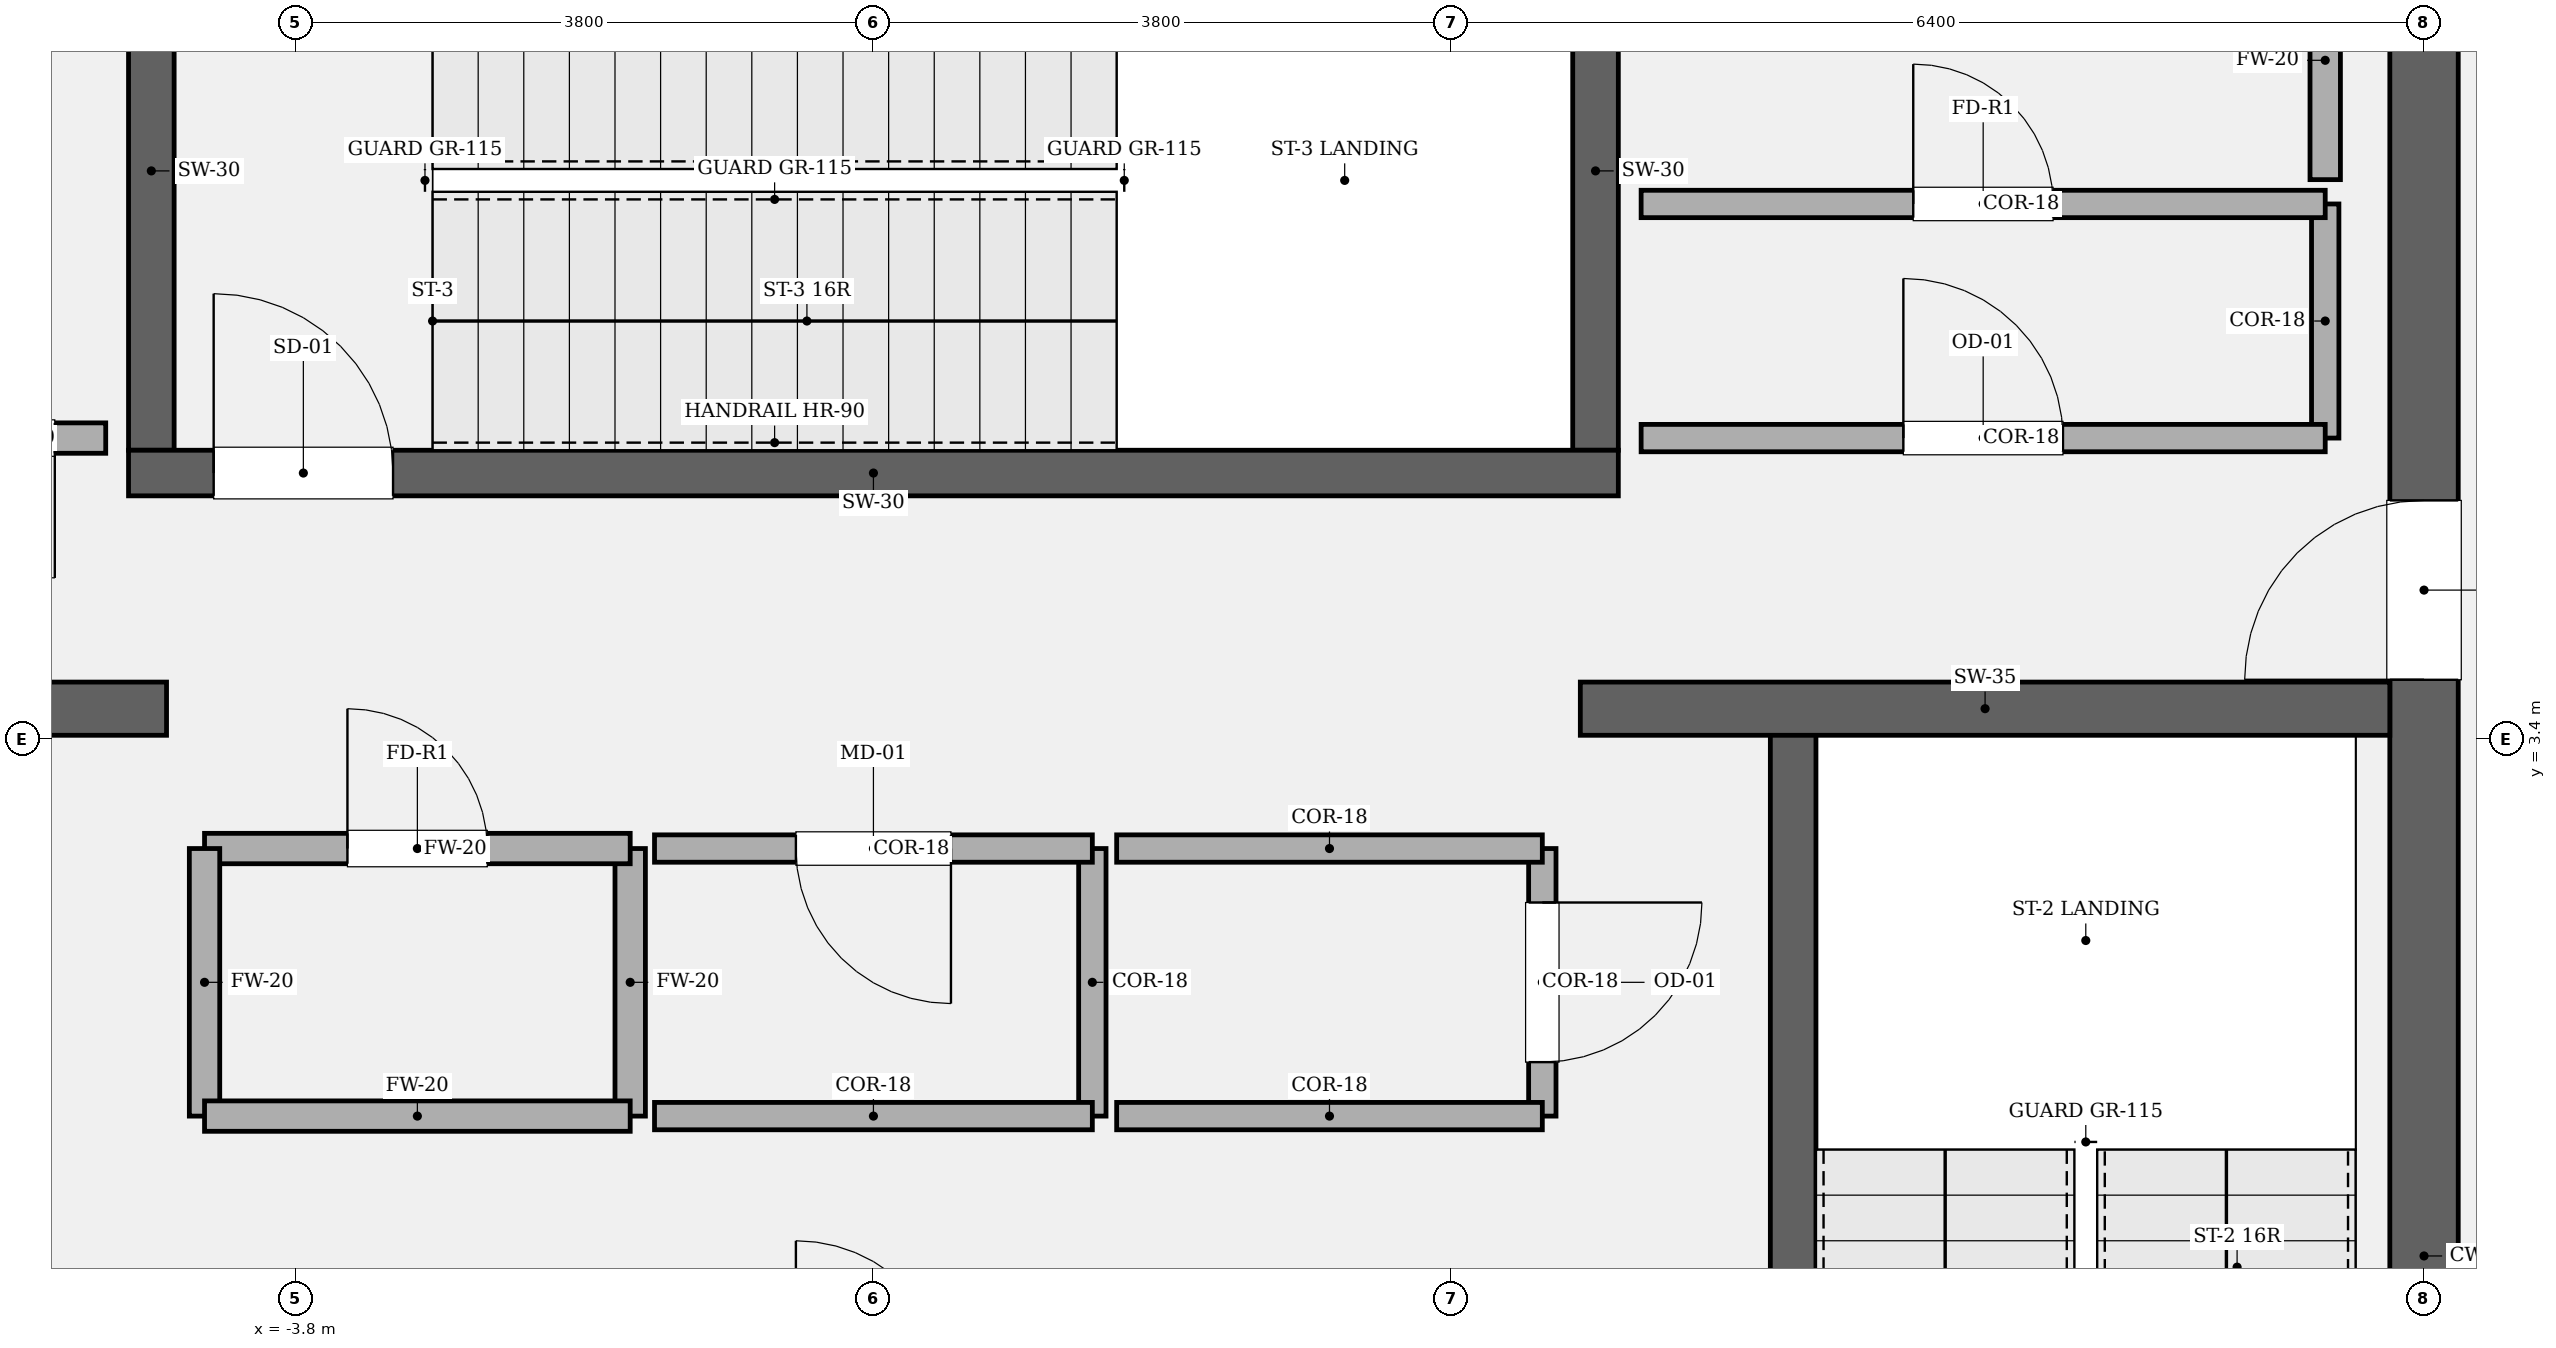
"""IFC4 building model, lengths in metres.
Left out: names, types, materials, properties, quantities, classifications, styles, units other than length and angle.
Written with IfcOpenShell. Run it as: python <this file> out.ifc"""

import sys

from ifc_helpers import new_model, si_unit, direction, frame, frame_2d, origin, place, context, subcontext, project, spatial, rectangle, extrude, element, fill, save


model = new_model("IFC4")
c1 = context("Model", 3, precision=1e-05, world=origin(), true_north=direction((0.0, 1.0)))
c2 = subcontext(c1, "Body", "Model", "MODEL_VIEW")
j1 = project(units=[si_unit("LENGTHUNIT", "METRE"), si_unit("PLANEANGLEUNIT", "RADIAN")], contexts=[c1])
p1 = place(None, origin())
s1 = spatial("IfcSite", under=j1, at=p1, CompositionType="ELEMENT")
p2 = place(p1, origin())
s2 = spatial("IfcBuilding", under=s1, at=p2, CompositionType="ELEMENT")
p3 = place(p2, frame((0.0, 0.0, 339.0)))
s3 = spatial("IfcBuildingStorey", under=s2, at=p3, CompositionType="ELEMENT", Elevation=339.0)
p4 = place(p3, frame((10.2, 8.975, 0.0), z_axis=(0.0, 0.0, 1.0), x_axis=(0.0, -1.0, 0.0)))
e1 = element("IfcWall", 1, at=p4, inside=s3, PredefinedType="SHEAR", context=c2, shape_type="SweptSolid", body=[
    extrude(rectangle(XDim=17.95, YDim=0.45, at=frame_2d((8.975, 0.0))), origin(), (0.0, 0.0, 1.0), 4.8),
])
p5 = place(p4, frame((4.005, 0.0, 0.0)))
e2 = element("IfcOpeningElement", 2, at=p5, cuts=e1, PredefinedType="OPENING", context=c2, shape_type="SweptSolid", body=[
    extrude(rectangle(XDim=1.18, YDim=2.2, at=frame_2d((0.59, 1.1))), frame((0.0, 0.235, 0.0), z_axis=(0.0, -1.0, 0.0), x_axis=(1.0, 0.0, 0.0)), (0.0, 0.0, 1.0), 0.47),
])
p6 = place(p3, frame((6.05, 3.45, 0.0), z_axis=(0.0, 0.0, 1.0), x_axis=(0.0, -1.0, 0.0)))
e3 = element("IfcWall", 3, at=p6, inside=s3, PredefinedType="SOLIDWALL", context=c2, shape_type="SweptSolid", body=[
    extrude(rectangle(XDim=8.95, YDim=0.3, at=frame_2d((4.475, 0.0))), origin(), (0.0, 0.0, 1.0), 4.8),
])
for number, where, z_axis, x_axis in (
    (4, (-4.75, 5.3, 0.0), (0.0, 0.0, 1.0), (0.0, 1.0, 0.0)),
    (5, (4.75, 8.975, 0.0), (0.0, 0.0, 1.0), (0.0, -1.0, 0.0)),
):
    element("IfcWall", number, at=place(p3, frame(where, z_axis=z_axis, x_axis=x_axis)), inside=s3, PredefinedType="SOLIDWALL", context=c2, shape_type="SweptSolid", body=[
        extrude(rectangle(XDim=3.675, YDim=0.3, at=frame_2d((1.837, 0.0))), origin(), (0.0, 0.0, 1.0), 4.8),
    ])
p7 = place(p3, frame((-4.9, 5.15, 0.0), z_axis=(0.0, 0.0, 1.0), x_axis=(1.0, 0.0, 0.0)))
e6 = element("IfcWall", 6, at=p7, inside=s3, PredefinedType="SOLIDWALL", context=c2, shape_type="SweptSolid", body=[
    extrude(rectangle(XDim=9.8, YDim=0.3, at=frame_2d((4.9, 0.0))), origin(), (0.0, 0.0, 1.0), 4.8),
])
p8 = place(p7, frame((0.56, 0.0, 0.0)))
e7 = element("IfcOpeningElement", 7, at=p8, cuts=e6, PredefinedType="OPENING", context=c2, shape_type="SweptSolid", body=[
    extrude(rectangle(XDim=1.18, YDim=2.2, at=frame_2d((0.59, 1.1))), frame((0.0, 0.16, 0.0), z_axis=(0.0, -1.0, 0.0), x_axis=(1.0, 0.0, 0.0)), (0.0, 0.0, 1.0), 0.32),
])
for number, where, z_axis, x_axis in (
    (8, (-9.975, 3.6, 0.0), (0.0, 0.0, 1.0), (1.0, 0.0, 0.0)),
    (9, (4.65, 3.6, 0.0), (0.0, 0.0, 1.0), (1.0, 0.0, 0.0)),
):
    element("IfcWall", number, at=place(p3, frame(where, z_axis=z_axis, x_axis=x_axis)), inside=s3, PredefinedType="SOLIDWALL", context=c2, shape_type="SweptSolid", body=[
        extrude(rectangle(XDim=5.325, YDim=0.35, at=frame_2d((2.663, 0.0))), origin(), (0.0, 0.0, 1.0), 4.8),
    ])
p9 = place(p3, frame((-1.6, 0.92, 0.0), z_axis=(0.0, 0.0, 1.0), x_axis=(0.0, 1.0, 0.0)))
e10 = element("IfcWall", 10, at=p9, inside=s3, PredefinedType="SOLIDWALL", context=c2, shape_type="SweptSolid", body=[
    extrude(rectangle(XDim=1.76, YDim=0.2, at=frame_2d((0.88, 0.0))), origin(), (0.0, 0.0, 1.0), 4.52),
])
p10 = place(p3, frame((-1.6, 2.68, 0.0), z_axis=(0.0, 0.0, 1.0), x_axis=(-1.0, 0.0, 0.0)))
e11 = element("IfcWall", 11, at=p10, inside=s3, PredefinedType="SOLIDWALL", context=c2, shape_type="SweptSolid", body=[
    extrude(rectangle(XDim=2.8, YDim=0.2, at=frame_2d((1.4, 0.0))), origin(), (0.0, 0.0, 1.0), 4.52),
])
p11 = place(p10, frame((0.94, 0.0, 0.0)))
e12 = element("IfcOpeningElement", 12, at=p11, cuts=e11, PredefinedType="OPENING", context=c2, shape_type="SweptSolid", body=[
    extrude(rectangle(XDim=0.92, YDim=2.1, at=frame_2d((0.46, 1.05))), frame((0.0, 0.11, 0.0), z_axis=(0.0, -1.0, 0.0), x_axis=(1.0, 0.0, 0.0)), (0.0, 0.0, 1.0), 0.22),
])
p12 = place(p3, frame((-4.4, 2.68, 0.0), z_axis=(0.0, 0.0, 1.0), x_axis=(0.0, -1.0, 0.0)))
e13 = element("IfcWall", 13, at=p12, inside=s3, PredefinedType="SOLIDWALL", context=c2, shape_type="SweptSolid", body=[
    extrude(rectangle(XDim=1.76, YDim=0.2, at=frame_2d((0.88, 0.0))), origin(), (0.0, 0.0, 1.0), 4.52),
])
p13 = place(p3, frame((-4.4, 0.92, 0.0), z_axis=(0.0, 0.0, 1.0), x_axis=(1.0, 0.0, 0.0)))
e14 = element("IfcWall", 14, at=p13, inside=s3, PredefinedType="SOLIDWALL", context=c2, shape_type="SweptSolid", body=[
    extrude(rectangle(XDim=2.8, YDim=0.2, at=frame_2d((1.4, 0.0))), origin(), (0.0, 0.0, 1.0), 4.52),
])
p14 = place(p3, frame((1.44, 0.92, 0.0), z_axis=(0.0, 0.0, 1.0), x_axis=(0.0, 1.0, 0.0)))
e15 = element("IfcWall", 15, at=p14, inside=s3, PredefinedType="PARTITIONING", context=c2, shape_type="SweptSolid", body=[
    extrude(rectangle(XDim=1.76, YDim=0.18, at=frame_2d((0.88, 0.0))), origin(), (0.0, 0.0, 1.0), 4.52),
])
p15 = place(p3, frame((1.44, 2.68, 0.0), z_axis=(0.0, 0.0, 1.0), x_axis=(-1.0, 0.0, 0.0)))
e16 = element("IfcWall", 16, at=p15, inside=s3, PredefinedType="PARTITIONING", context=c2, shape_type="SweptSolid", body=[
    extrude(rectangle(XDim=2.88, YDim=0.18, at=frame_2d((1.44, 0.0))), origin(), (0.0, 0.0, 1.0), 4.52),
])
p16 = place(p15, frame((0.93, 0.0, 0.0)))
e17 = element("IfcOpeningElement", 17, at=p16, cuts=e16, PredefinedType="OPENING", context=c2, shape_type="SweptSolid", body=[
    extrude(rectangle(XDim=1.02, YDim=2.2, at=frame_2d((0.51, 1.1))), frame((0.0, 0.1, 0.0), z_axis=(0.0, -1.0, 0.0), x_axis=(1.0, 0.0, 0.0)), (0.0, 0.0, 1.0), 0.2),
])
p17 = place(p3, frame((-1.44, 0.92, 0.0), z_axis=(0.0, 0.0, 1.0), x_axis=(1.0, 0.0, 0.0)))
e18 = element("IfcWall", 18, at=p17, inside=s3, PredefinedType="PARTITIONING", context=c2, shape_type="SweptSolid", body=[
    extrude(rectangle(XDim=2.88, YDim=0.18, at=frame_2d((1.44, 0.0))), origin(), (0.0, 0.0, 1.0), 4.52),
])
p18 = place(p3, frame((4.4, 0.92, 0.0), z_axis=(0.0, 0.0, 1.0), x_axis=(0.0, 1.0, 0.0)))
e19 = element("IfcWall", 19, at=p18, inside=s3, PredefinedType="PARTITIONING", context=c2, shape_type="SweptSolid", body=[
    extrude(rectangle(XDim=1.76, YDim=0.18, at=frame_2d((0.88, 0.0))), origin(), (0.0, 0.0, 1.0), 4.52),
])
p19 = place(p18, frame((0.355, 0.0, 0.0)))
e20 = element("IfcOpeningElement", 20, at=p19, cuts=e19, PredefinedType="OPENING", context=c2, shape_type="SweptSolid", body=[
    extrude(rectangle(XDim=1.05, YDim=2.2, at=frame_2d((0.525, 1.1))), frame((0.0, 0.1, 0.0), z_axis=(0.0, -1.0, 0.0), x_axis=(1.0, 0.0, 0.0)), (0.0, 0.0, 1.0), 0.2),
])
for number, where, z_axis, x_axis in (
    (21, (4.4, 2.68, 0.0), (0.0, 0.0, 1.0), (-1.0, 0.0, 0.0)),
    (22, (1.6, 0.92, 0.0), (0.0, 0.0, 1.0), (1.0, 0.0, 0.0)),
):
    element("IfcWall", number, at=place(p3, frame(where, z_axis=z_axis, x_axis=x_axis)), inside=s3, PredefinedType="PARTITIONING", context=c2, shape_type="SweptSolid", body=[
        extrude(rectangle(XDim=2.8, YDim=0.18, at=frame_2d((1.4, 0.0))), origin(), (0.0, 0.0, 1.0), 4.52),
    ])
p20 = place(p3, frame((-6.64, 5.38, 0.0), z_axis=(0.0, 0.0, 1.0), x_axis=(1.0, 0.0, 0.0)))
e23 = element("IfcWall", 23, at=p20, inside=s3, PredefinedType="SOLIDWALL", context=c2, shape_type="SweptSolid", body=[
    extrude(rectangle(XDim=1.59, YDim=0.2, at=frame_2d((0.795, 0.0))), origin(), (0.0, 0.0, 1.0), 4.52),
])
p21 = place(p20, frame((0.335, 0.0, 0.0)))
e24 = element("IfcOpeningElement", 24, at=p21, cuts=e23, PredefinedType="OPENING", context=c2, shape_type="SweptSolid", body=[
    extrude(rectangle(XDim=0.92, YDim=2.1, at=frame_2d((0.46, 1.05))), frame((0.0, 0.11, 0.0), z_axis=(0.0, -1.0, 0.0), x_axis=(1.0, 0.0, 0.0)), (0.0, 0.0, 1.0), 0.22),
])
p22 = place(p3, frame((9.55, 5.38, 0.0), z_axis=(0.0, 0.0, 1.0), x_axis=(0.0, 1.0, 0.0)))
e25 = element("IfcWall", 25, at=p22, inside=s3, PredefinedType="PARTITIONING", context=c2, shape_type="SweptSolid", body=[
    extrude(rectangle(XDim=1.54, YDim=0.18, at=frame_2d((0.77, 0.0))), origin(), (0.0, 0.0, 1.0), 4.52),
])
p23 = place(p3, frame((9.55, 6.92, 0.0), z_axis=(0.0, 0.0, 1.0), x_axis=(-1.0, 0.0, 0.0)))
e26 = element("IfcWall", 26, at=p23, inside=s3, PredefinedType="PARTITIONING", context=c2, shape_type="SweptSolid", body=[
    extrude(rectangle(XDim=4.5, YDim=0.18, at=frame_2d((2.25, 0.0))), origin(), (0.0, 0.0, 1.0), 4.52),
])
p24 = place(p23, frame((1.79, 0.0, 0.0)))
e27 = element("IfcOpeningElement", 27, at=p24, cuts=e26, PredefinedType="OPENING", context=c2, shape_type="SweptSolid", body=[
    extrude(rectangle(XDim=0.92, YDim=2.1, at=frame_2d((0.46, 1.05))), frame((0.0, 0.1, 0.0), z_axis=(0.0, -1.0, 0.0), x_axis=(1.0, 0.0, 0.0)), (0.0, 0.0, 1.0), 0.2),
])
p25 = place(p3, frame((5.05, 5.38, 0.0), z_axis=(0.0, 0.0, 1.0), x_axis=(1.0, 0.0, 0.0)))
e28 = element("IfcWall", 28, at=p25, inside=s3, PredefinedType="PARTITIONING", context=c2, shape_type="SweptSolid", body=[
    extrude(rectangle(XDim=4.5, YDim=0.18, at=frame_2d((2.25, 0.0))), origin(), (0.0, 0.0, 1.0), 4.52),
])
p26 = place(p25, frame((1.725, 0.0, 0.0)))
e29 = element("IfcOpeningElement", 29, at=p26, cuts=e28, PredefinedType="OPENING", context=c2, shape_type="SweptSolid", body=[
    extrude(rectangle(XDim=1.05, YDim=2.2, at=frame_2d((0.525, 1.1))), frame((0.0, 0.1, 0.0), z_axis=(0.0, -1.0, 0.0), x_axis=(1.0, 0.0, 0.0)), (0.0, 0.0, 1.0), 0.2),
])
p27 = place(p3, frame((9.55, 7.08, 0.0), z_axis=(0.0, 0.0, 1.0), x_axis=(0.0, 1.0, 0.0)))
e30 = element("IfcWall", 30, at=p27, inside=s3, PredefinedType="SOLIDWALL", context=c2, shape_type="SweptSolid", body=[
    extrude(rectangle(XDim=1.57, YDim=0.2, at=frame_2d((0.785, 0.0))), origin(), (0.0, 0.0, 1.0), 4.52),
])
p28 = place(p8, origin())
e31 = element("IfcDoor", 31, at=p28, inside=s3, OperationType="SINGLE_SWING_LEFT", PredefinedType="DOOR", context=c2, shape_type="SweptSolid", body=[
    extrude(rectangle(XDim=1.18, YDim=2.2, at=frame_2d((0.59, 1.1))), frame((0.0, 0.025, 0.0), z_axis=(0.0, -1.0, 0.0), x_axis=(1.0, 0.0, 0.0)), (0.0, 0.0, 1.0), 0.05),
])
fill(e7, e31)
p29 = place(p5, origin())
e32 = element("IfcDoor", 32, at=p29, inside=s3, OperationType="SINGLE_SWING_RIGHT", PredefinedType="DOOR", context=c2, shape_type="SweptSolid", body=[
    extrude(rectangle(XDim=1.18, YDim=2.2, at=frame_2d((0.59, 1.1))), frame((0.0, 0.025, 0.0), z_axis=(0.0, -1.0, 0.0), x_axis=(1.0, 0.0, 0.0)), (0.0, 0.0, 1.0), 0.05),
])
fill(e2, e32)
p30 = place(p11, origin())
e33 = element("IfcDoor", 33, at=p30, inside=s3, OperationType="SINGLE_SWING_RIGHT", PredefinedType="DOOR", context=c2, shape_type="SweptSolid", body=[
    extrude(rectangle(XDim=0.92, YDim=2.1, at=frame_2d((0.46, 1.05))), frame((0.0, 0.025, 0.0), z_axis=(0.0, -1.0, 0.0), x_axis=(1.0, 0.0, 0.0)), (0.0, 0.0, 1.0), 0.05),
])
fill(e12, e33)
p31 = place(p16, origin())
e34 = element("IfcDoor", 34, at=p31, inside=s3, OperationType="SINGLE_SWING_LEFT", PredefinedType="DOOR", context=c2, shape_type="SweptSolid", body=[
    extrude(rectangle(XDim=1.02, YDim=2.2, at=frame_2d((0.51, 1.1))), frame((0.0, 0.025, 0.0), z_axis=(0.0, -1.0, 0.0), x_axis=(1.0, 0.0, 0.0)), (0.0, 0.0, 1.0), 0.05),
])
fill(e17, e34)
p32 = place(p19, origin())
e35 = element("IfcDoor", 35, at=p32, inside=s3, OperationType="SINGLE_SWING_RIGHT", PredefinedType="DOOR", context=c2, shape_type="SweptSolid", body=[
    extrude(rectangle(XDim=1.05, YDim=2.2, at=frame_2d((0.525, 1.1))), frame((0.0, 0.025, 0.0), z_axis=(0.0, -1.0, 0.0), x_axis=(1.0, 0.0, 0.0)), (0.0, 0.0, 1.0), 0.05),
])
fill(e20, e35)
p33 = place(p21, origin())
e36 = element("IfcDoor", 36, at=p33, inside=s3, OperationType="SINGLE_SWING_RIGHT", PredefinedType="DOOR", context=c2, shape_type="SweptSolid", body=[
    extrude(rectangle(XDim=0.92, YDim=2.1, at=frame_2d((0.46, 1.05))), frame((0.0, 0.025, 0.0), z_axis=(0.0, -1.0, 0.0), x_axis=(1.0, 0.0, 0.0)), (0.0, 0.0, 1.0), 0.05),
])
fill(e24, e36)
p34 = place(p26, origin())
e37 = element("IfcDoor", 37, at=p34, inside=s3, OperationType="SINGLE_SWING_LEFT", PredefinedType="DOOR", context=c2, shape_type="SweptSolid", body=[
    extrude(rectangle(XDim=1.05, YDim=2.2, at=frame_2d((0.525, 1.1))), frame((0.0, 0.025, 0.0), z_axis=(0.0, -1.0, 0.0), x_axis=(1.0, 0.0, 0.0)), (0.0, 0.0, 1.0), 0.05),
])
fill(e29, e37)
p35 = place(p24, origin())
e38 = element("IfcDoor", 38, at=p35, inside=s3, OperationType="SINGLE_SWING_RIGHT", PredefinedType="DOOR", context=c2, shape_type="SweptSolid", body=[
    extrude(rectangle(XDim=0.92, YDim=2.1, at=frame_2d((0.46, 1.05))), frame((0.0, 0.025, 0.0), z_axis=(0.0, -1.0, 0.0), x_axis=(1.0, 0.0, 0.0)), (0.0, 0.0, 1.0), 0.05),
])
fill(e27, e38)
save(model, sys.argv[1])
